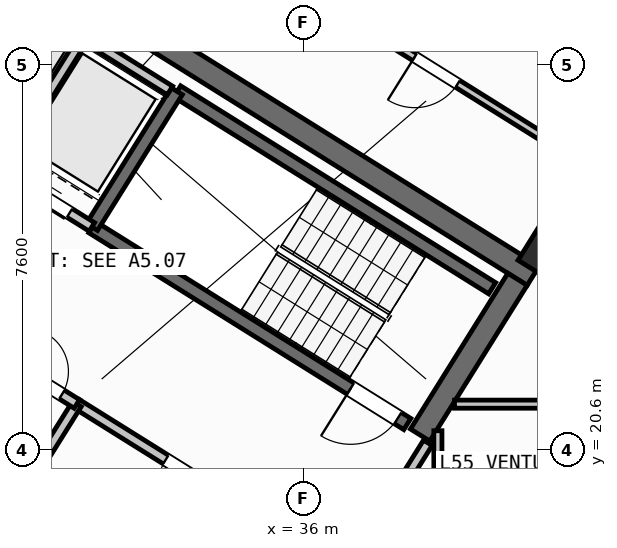
"""IFC4 building model, lengths in metres.
Left out: names, types, materials, properties, quantities, classifications, styles, units other than length and angle.
Written with IfcOpenShell. Run it as: python <this file> out.ifc"""

import sys

from ifc_helpers import new_model, si_unit, direction, frame, frame_2d, origin, origin_2d, place, context, subcontext, project, spatial, rectangle, hollow_rectangle, extrude, source, transform, mapped, element, fill, save


model = new_model("IFC4")
c1 = context("Model", 3, precision=1e-05, world=origin(), true_north=direction((0.0, 1.0)))
c2 = subcontext(c1, "Body", "Model", "MODEL_VIEW")
j1 = project(units=[si_unit("LENGTHUNIT", "METRE"), si_unit("PLANEANGLEUNIT", "RADIAN")], contexts=[c1])
p1 = place(None, origin())
s1 = spatial("IfcSite", under=j1, at=p1, CompositionType="ELEMENT")
p2 = place(p1, origin())
s2 = spatial("IfcBuilding", under=s1, at=p2, CompositionType="ELEMENT")
p3 = place(p2, frame((0.0, 0.0, 218.4)))
s3 = spatial("IfcBuildingStorey", under=s2, at=p3, CompositionType="ELEMENT", Elevation=218.4)
p4 = place(p3, frame((40.531, 24.036, 0.0), z_axis=(0.0, 0.0, 1.0), x_axis=(-0.848048787466, 0.529918157905, 0.0)))
e1 = element("IfcWall", 1, at=p4, inside=s3, PredefinedType="SHEAR", context=c2, shape_type="SweptSolid", body=[
    extrude(rectangle(XDim=13.04, YDim=0.45, at=frame_2d((6.52, 0.0))), origin(), (0.0, 0.0, 1.0), 3.35),
])
p5 = place(p3, frame((40.221, 23.965, 0.0), z_axis=(0.0, 0.0, 1.0), x_axis=(-0.529902075036, -0.848058836916, 0.0)))
e2 = element("IfcWall", 2, at=p5, inside=s3, PredefinedType="SHEAR", context=c2, shape_type="SweptSolid", body=[
    extrude(rectangle(XDim=3.625, YDim=0.45, at=frame_2d((1.812, 0.0))), origin(), (0.0, 0.0, 1.0), 3.35),
])
m1 = source(origin(), c2, "Body", "SweptSolid", [
    extrude(hollow_rectangle(XDim=0.8, YDim=0.8, WallThickness=0.032, at=origin_2d()), origin(), (0.0, 0.0, 1.0), 3.6),
])
p6 = place(p3, frame((40.783, 24.469, 0.0), z_axis=(0.0, 0.0, 1.0), x_axis=(-0.848048096156, 0.529919264233, 0.0)))
e3 = element("IfcColumn", 3, at=p6, inside=s3, PredefinedType="COLUMN", context=c2, shape_type="MappedRepresentation", body=[
    mapped(m1, transform((0.0, 0.0, 0.0), scale=1.0)),
])
p7 = place(p3, frame((31.76, 12.183, 0.0), z_axis=(0.0, 0.0, 1.0), x_axis=(-0.848047074256, 0.529920899612, 0.0)))
e4 = element("IfcWall", 4, at=p7, inside=s3, PredefinedType="STANDARD", context=c2, shape_type="SweptSolid", body=[
    extrude(rectangle(XDim=30.652, YDim=0.32, at=frame_2d((15.326, 0.0))), origin(), (0.0, 0.0, 1.0), 3.35),
])
p8 = place(p7, frame((15.166, 0.0, 0.0)))
e5 = element("IfcOpeningElement", 5, at=p8, cuts=e4, PredefinedType="OPENING", context=c2, shape_type="SweptSolid", body=[
    extrude(rectangle(XDim=1.2, YDim=2.15, at=frame_2d((0.6, 1.075))), frame((0.0, 0.17, 0.0), z_axis=(0.0, -1.0, 0.0), x_axis=(1.0, 0.0, 0.0)), (0.0, 0.0, 1.0), 0.34),
])
p9 = place(p7, frame((2.24, 0.0, 0.9)))
e6 = element("IfcOpeningElement", 6, at=p9, cuts=e4, PredefinedType="OPENING", context=c2, shape_type="SweptSolid", body=[
    extrude(rectangle(XDim=1.65, YDim=1.45, at=frame_2d((0.825, 0.725))), frame((0.0, 0.17, 0.0), z_axis=(0.0, -1.0, 0.0), x_axis=(1.0, 0.0, 0.0)), (0.0, 0.0, 1.0), 0.34),
])
p10 = place(p7, frame((7.469, 0.0, 0.9)))
e7 = element("IfcOpeningElement", 7, at=p10, cuts=e4, PredefinedType="OPENING", context=c2, shape_type="SweptSolid", body=[
    extrude(rectangle(XDim=1.65, YDim=1.45, at=frame_2d((0.825, 0.725))), frame((0.0, 0.17, 0.0), z_axis=(0.0, -1.0, 0.0), x_axis=(1.0, 0.0, 0.0)), (0.0, 0.0, 1.0), 0.34),
])
p11 = place(p7, frame((12.623, 0.0, 1.0)))
e8 = element("IfcOpeningElement", 8, at=p11, cuts=e4, PredefinedType="OPENING", context=c2, shape_type="SweptSolid", body=[
    extrude(rectangle(XDim=0.9, YDim=1.25, at=frame_2d((0.45, 0.625))), frame((0.0, 0.17, 0.0), z_axis=(0.0, -1.0, 0.0), x_axis=(1.0, 0.0, 0.0)), (0.0, 0.0, 1.0), 0.34),
])
p12 = place(p7, frame((19.583, 0.0, 1.0)))
e9 = element("IfcOpeningElement", 9, at=p12, cuts=e4, PredefinedType="OPENING", context=c2, shape_type="SweptSolid", body=[
    extrude(rectangle(XDim=0.9, YDim=1.25, at=frame_2d((0.45, 0.625))), frame((0.0, 0.17, 0.0), z_axis=(0.0, -1.0, 0.0), x_axis=(1.0, 0.0, 0.0)), (0.0, 0.0, 1.0), 0.34),
])
p13 = place(p7, frame((22.033, 0.0, 1.0)))
e10 = element("IfcOpeningElement", 10, at=p13, cuts=e4, PredefinedType="OPENING", context=c2, shape_type="SweptSolid", body=[
    extrude(rectangle(XDim=0.9, YDim=1.25, at=frame_2d((0.45, 0.625))), frame((0.0, 0.17, 0.0), z_axis=(0.0, -1.0, 0.0), x_axis=(1.0, 0.0, 0.0)), (0.0, 0.0, 1.0), 0.34),
])
p14 = place(p7, frame((27.666, 0.0, 0.9)))
e11 = element("IfcOpeningElement", 11, at=p14, cuts=e4, PredefinedType="OPENING", context=c2, shape_type="SweptSolid", body=[
    extrude(rectangle(XDim=1.35, YDim=1.45, at=frame_2d((0.675, 0.725))), frame((0.0, 0.17, 0.0), z_axis=(0.0, -1.0, 0.0), x_axis=(1.0, 0.0, 0.0)), (0.0, 0.0, 1.0), 0.34),
])
p15 = place(p3, frame((31.28, 18.261, 0.0), z_axis=(0.0, 0.0, 1.0), x_axis=(-0.848051618787, 0.529913626805, 0.0)))
e12 = element("IfcWall", 12, at=p15, inside=s3, PredefinedType="SHEAR", context=c2, shape_type="SweptSolid", body=[
    extrude(rectangle(XDim=7.46, YDim=0.26, at=frame_2d((3.73, 0.0))), origin(), (0.0, 0.0, 1.0), 3.35),
])
p16 = place(p15, frame((0.36, 0.0, 0.0)))
e13 = element("IfcOpeningElement", 13, at=p16, cuts=e12, PredefinedType="OPENING", context=c2, shape_type="SweptSolid", body=[
    extrude(rectangle(XDim=0.86, YDim=2.05, at=frame_2d((0.43, 1.025))), frame((0.0, 0.14, 0.0), z_axis=(0.0, -1.0, 0.0), x_axis=(1.0, 0.0, 0.0)), (0.0, 0.0, 1.0), 0.28),
])
p17 = place(p3, frame((39.721, 23.788, 0.0), z_axis=(0.0, 0.0, 1.0), x_axis=(-0.848054434086, 0.529909121291, 0.0)))
e14 = element("IfcWall", 14, at=p17, inside=s3, PredefinedType="SHEAR", context=c2, shape_type="SweptSolid", body=[
    extrude(rectangle(XDim=7.33, YDim=0.26, at=frame_2d((3.665, 0.0))), origin(), (0.0, 0.0, 1.0), 3.35),
])
p18 = place(p3, frame((38.046, 21.108, 0.0), z_axis=(0.0, 0.0, 1.0), x_axis=(-0.848054434086, 0.529909121291, 0.0)))
e15 = element("IfcWall", 15, at=p18, inside=s3, PredefinedType="SHEAR", context=c2, shape_type="SweptSolid", body=[
    extrude(rectangle(XDim=7.33, YDim=0.26, at=frame_2d((3.665, 0.0))), origin(), (0.0, 0.0, 1.0), 3.35),
])
p19 = place(p18, frame((0.22, 0.0, 0.0)))
e16 = element("IfcOpeningElement", 16, at=p19, cuts=e15, PredefinedType="OPENING", context=c2, shape_type="SweptSolid", body=[
    extrude(rectangle(XDim=1.1, YDim=2.1, at=frame_2d((0.55, 1.05))), frame((0.0, 0.14, 0.0), z_axis=(0.0, -1.0, 0.0), x_axis=(1.0, 0.0, 0.0)), (0.0, 0.0, 1.0), 0.28),
])
p20 = place(p3, frame((33.496, 27.677, 0.0), z_axis=(0.0, 0.0, 1.0), x_axis=(-0.529908658664, -0.84805472316, 0.0)))
e17 = element("IfcWall", 17, at=p20, inside=s3, PredefinedType="SHEAR", context=c2, shape_type="SweptSolid", body=[
    extrude(rectangle(XDim=3.16, YDim=0.26, at=frame_2d((1.58, 0.0))), origin(), (0.0, 0.0, 1.0), 3.35),
])
p21 = place(p3, frame((36.459, 18.421, 0.0), z_axis=(0.0, 0.0, 1.0), x_axis=(-0.848059591691, 0.529900867089, 0.0)))
e18 = element("IfcWall", 18, at=p21, inside=s3, PredefinedType="STANDARD", context=c2, shape_type="SweptSolid", body=[
    extrude(rectangle(XDim=5.818, YDim=0.2, at=frame_2d((2.909, 0.0))), origin(), (0.0, 0.0, 1.0), 3.34),
])
p22 = place(p21, frame((2.598, 0.0, 0.0)))
e19 = element("IfcOpeningElement", 19, at=p22, cuts=e18, PredefinedType="OPENING", context=c2, shape_type="SweptSolid", body=[
    extrude(rectangle(XDim=1.15, YDim=2.1, at=frame_2d((0.575, 1.05))), frame((0.0, 0.11, 0.0), z_axis=(0.0, -1.0, 0.0), x_axis=(1.0, 0.0, 0.0)), (0.0, 0.0, 1.0), 0.22),
])
p23 = place(p3, frame((31.822, 24.998, 0.0), z_axis=(0.0, 0.0, 1.0), x_axis=(-0.848054125777, 0.529909614701, 0.0)))
e20 = element("IfcWall", 20, at=p23, inside=s3, PredefinedType="STANDARD", context=c2, shape_type="SweptSolid", body=[
    extrude(rectangle(XDim=4.668, YDim=0.2, at=frame_2d((2.334, 0.0))), origin(), (0.0, 0.0, 1.0), 3.34),
])
p24 = place(p23, frame((0.52, 0.0, 0.0)))
e21 = element("IfcOpeningElement", 21, at=p24, cuts=e20, PredefinedType="OPENING", context=c2, shape_type="SweptSolid", body=[
    extrude(rectangle(XDim=1.2, YDim=2.15, at=frame_2d((0.6, 1.075))), frame((0.0, 0.11, 0.0), z_axis=(0.0, -1.0, 0.0), x_axis=(1.0, 0.0, 0.0)), (0.0, 0.0, 1.0), 0.22),
])
p25 = place(p23, frame((2.54, 0.0, 0.0)))
e22 = element("IfcOpeningElement", 22, at=p25, cuts=e20, PredefinedType="OPENING", context=c2, shape_type="SweptSolid", body=[
    extrude(rectangle(XDim=1.2, YDim=2.15, at=frame_2d((0.6, 1.075))), frame((0.0, 0.11, 0.0), z_axis=(0.0, -1.0, 0.0), x_axis=(1.0, 0.0, 0.0)), (0.0, 0.0, 1.0), 0.22),
])
p26 = place(p3, frame((31.645, 28.716, 0.0), z_axis=(0.0, 0.0, 1.0), x_axis=(-0.52986693015, -0.848080795876, 0.0)))
e23 = element("IfcWall", 23, at=p26, inside=s3, PredefinedType="STANDARD", context=c2, shape_type="SweptSolid", body=[
    extrude(rectangle(XDim=2.66, YDim=0.2, at=frame_2d((1.33, 0.0))), origin(), (0.0, 0.0, 1.0), 3.34),
])
p27 = place(p3, frame((33.363, 27.69, 0.0), z_axis=(0.0, 0.0, 1.0), x_axis=(-0.84804957148, 0.529916903215, 0.0)))
e24 = element("IfcWall", 24, at=p27, inside=s3, PredefinedType="STANDARD", context=c2, shape_type="SweptSolid", body=[
    extrude(rectangle(XDim=4.548, YDim=0.2, at=frame_2d((2.274, 0.0))), origin(), (0.0, 0.0, 1.0), 3.34),
])
p28 = place(p3, frame((31.525, 21.504, 0.0), z_axis=(0.0, 0.0, 1.0), x_axis=(-0.529907497854, -0.848055448493, 0.0)))
e25 = element("IfcWall", 25, at=p28, inside=s3, PredefinedType="STANDARD", context=c2, shape_type="SweptSolid", body=[
    extrude(rectangle(XDim=2.88, YDim=0.2, at=frame_2d((1.44, 0.0))), origin(), (0.0, 0.0, 1.0), 3.34),
])
p29 = place(p3, frame((31.525, 21.504, 0.0), z_axis=(0.0, 0.0, 1.0), x_axis=(-0.848042066329, 0.529928913853, 0.0)))
e26 = element("IfcWall", 26, at=p29, inside=s3, PredefinedType="STANDARD", context=c2, shape_type="SweptSolid", body=[
    extrude(rectangle(XDim=6.268, YDim=0.2, at=frame_2d((3.134, 0.0))), origin(), (0.0, 0.0, 1.0), 3.34),
])
p30 = place(p29, frame((4.4, 0.0, 0.0)))
e27 = element("IfcOpeningElement", 27, at=p30, cuts=e26, PredefinedType="OPENING", context=c2, shape_type="SweptSolid", body=[
    extrude(rectangle(XDim=0.86, YDim=2.05, at=frame_2d((0.43, 1.025))), frame((0.0, 0.11, 0.0), z_axis=(0.0, -1.0, 0.0), x_axis=(1.0, 0.0, 0.0)), (0.0, 0.0, 1.0), 0.22),
])
p31 = place(p29, frame((0.35, 0.0, 0.0)))
e28 = element("IfcOpeningElement", 28, at=p31, cuts=e26, PredefinedType="OPENING", context=c2, shape_type="SweptSolid", body=[
    extrude(rectangle(XDim=0.86, YDim=2.05, at=frame_2d((0.43, 1.025))), frame((0.0, 0.11, 0.0), z_axis=(0.0, -1.0, 0.0), x_axis=(1.0, 0.0, 0.0)), (0.0, 0.0, 1.0), 0.22),
])
p32 = place(p3, frame((41.936, 26.012, 0.0), z_axis=(0.0, 0.0, 1.0), x_axis=(-0.848051154596, 0.529914369676, 0.0)))
e29 = element("IfcWall", 29, at=p32, inside=s3, PredefinedType="PARTITIONING", context=c2, shape_type="SweptSolid", body=[
    extrude(rectangle(XDim=15.57, YDim=0.16, at=frame_2d((7.785, 0.0))), origin(), (0.0, 0.0, 1.0), 3.34),
])
p33 = place(p32, frame((3.415, 0.0, 0.0)))
e30 = element("IfcOpeningElement", 30, at=p33, cuts=e29, PredefinedType="OPENING", context=c2, shape_type="SweptSolid", body=[
    extrude(rectangle(XDim=1.0, YDim=2.1, at=frame_2d((0.5, 1.05))), frame((0.0, 0.09, 0.0), z_axis=(0.0, -1.0, 0.0), x_axis=(1.0, 0.0, 0.0)), (0.0, 0.0, 1.0), 0.18),
])
p34 = place(p32, frame((10.565, 0.0, 0.0)))
e31 = element("IfcOpeningElement", 31, at=p34, cuts=e29, PredefinedType="OPENING", context=c2, shape_type="SweptSolid", body=[
    extrude(rectangle(XDim=1.0, YDim=2.1, at=frame_2d((0.5, 1.05))), frame((0.0, 0.09, 0.0), z_axis=(0.0, -1.0, 0.0), x_axis=(1.0, 0.0, 0.0)), (0.0, 0.0, 1.0), 0.18),
])
p35 = place(p3, frame((38.451, 20.737, 0.0), z_axis=(0.0, 0.0, 1.0), x_axis=(-0.529924799939, -0.848044637038, 0.0)))
e32 = element("IfcWall", 32, at=p35, inside=s3, PredefinedType="STANDARD", context=c2, shape_type="SweptSolid", body=[
    extrude(rectangle(XDim=2.96, YDim=0.2, at=frame_2d((1.48, 0.0))), origin(), (0.0, 0.0, 1.0), 3.34),
])
p36 = place(p35, frame((1.46, 0.0, 0.0)))
e33 = element("IfcOpeningElement", 33, at=p36, cuts=e32, PredefinedType="OPENING", context=c2, shape_type="SweptSolid", body=[
    extrude(rectangle(XDim=0.86, YDim=2.05, at=frame_2d((0.43, 1.025))), frame((0.0, 0.11, 0.0), z_axis=(0.0, -1.0, 0.0), x_axis=(1.0, 0.0, 0.0)), (0.0, 0.0, 1.0), 0.22),
])
p37 = place(p3, frame((38.65, 17.93, 0.0), z_axis=(0.0, 0.0, 1.0), x_axis=(0.0, 1.0, 0.0)))
e34 = element("IfcWall", 34, at=p37, inside=s3, PredefinedType="PARTITIONING", context=c2, shape_type="SweptSolid", body=[
    extrude(rectangle(XDim=3.046, YDim=0.16, at=frame_2d((1.523, 0.0))), origin(), (0.0, 0.0, 1.0), 3.34),
])
p38 = place(p3, frame((38.978, 21.5, 0.0), z_axis=(0.0, 0.0, 1.0), x_axis=(1.0, 0.0, 0.0)))
e35 = element("IfcWall", 35, at=p38, inside=s3, PredefinedType="PARTITIONING", context=c2, shape_type="SweptSolid", body=[
    extrude(rectangle(XDim=7.336, YDim=0.16, at=frame_2d((3.668, 0.0))), origin(), (0.0, 0.0, 1.0), 3.34),
])
m2 = source(origin(), c2, "Body", "SweptSolid", [
    extrude(rectangle(XDim=1.1, YDim=2.1, at=frame_2d((0.55, 1.05))), frame((0.0, 0.025, 0.0), z_axis=(0.0, -1.0, 0.0), x_axis=(1.0, 0.0, 0.0)), (0.0, 0.0, 1.0), 0.05),
])
p39 = place(p19, origin())
e36 = element("IfcDoor", 36, at=p39, inside=s3, OperationType="SINGLE_SWING_RIGHT", PredefinedType="DOOR", context=c2, shape_type="MappedRepresentation", body=[
    mapped(m2, transform((0.0, 0.0, 0.0), scale=1.0)),
])
fill(e16, e36)
m3 = source(origin(), c2, "Body", "SweptSolid", [
    extrude(rectangle(XDim=1.15, YDim=2.1, at=frame_2d((0.575, 1.05))), frame((0.0, 0.025, 0.0), z_axis=(0.0, -1.0, 0.0), x_axis=(1.0, 0.0, 0.0)), (0.0, 0.0, 1.0), 0.05),
])
p40 = place(p22, origin())
e37 = element("IfcDoor", 37, at=p40, inside=s3, OperationType="SINGLE_SWING_LEFT", PredefinedType="DOOR", context=c2, shape_type="MappedRepresentation", body=[
    mapped(m3, transform((0.0, 0.0, 0.0), scale=1.0)),
])
fill(e19, e37)
m4 = source(origin(), c2, "Body", "SweptSolid", [
    extrude(rectangle(XDim=1.2, YDim=2.15, at=frame_2d((0.6, 1.075))), frame((0.0, 0.025, 0.0), z_axis=(0.0, -1.0, 0.0), x_axis=(1.0, 0.0, 0.0)), (0.0, 0.0, 1.0), 0.05),
])
p41 = place(p24, origin())
e38 = element("IfcDoor", 38, at=p41, inside=s3, OperationType="DOUBLE_DOOR_SLIDING", PredefinedType="DOOR", context=c2, shape_type="MappedRepresentation", body=[
    mapped(m4, transform((0.0, 0.0, 0.0), scale=1.0)),
])
fill(e21, e38)
m5 = source(origin(), c2, "Body", "SweptSolid", [
    extrude(rectangle(XDim=0.86, YDim=2.05, at=frame_2d((0.43, 1.025))), frame((0.0, 0.025, 0.0), z_axis=(0.0, -1.0, 0.0), x_axis=(1.0, 0.0, 0.0)), (0.0, 0.0, 1.0), 0.05),
])
p42 = place(p31, frame((0.86, 0.0, 0.0), z_axis=(0.0, 0.0, 1.0), x_axis=(-1.0, 0.0, 0.0)))
e39 = element("IfcDoor", 39, at=p42, inside=s3, OperationType="SINGLE_SWING_LEFT", PredefinedType="DOOR", context=c2, shape_type="MappedRepresentation", body=[
    mapped(m5, transform((0.0, 0.0, 0.0), scale=1.0)),
])
fill(e28, e39)
m6 = source(origin(), c2, "Body", "SweptSolid", [
    extrude(rectangle(XDim=1.0, YDim=2.1, at=frame_2d((0.5, 1.05))), frame((0.0, 0.025, 0.0), z_axis=(0.0, -1.0, 0.0), x_axis=(1.0, 0.0, 0.0)), (0.0, 0.0, 1.0), 0.05),
])
p43 = place(p33, origin())
e40 = element("IfcDoor", 40, at=p43, inside=s3, OperationType="SINGLE_SWING_RIGHT", PredefinedType="DOOR", context=c2, shape_type="MappedRepresentation", body=[
    mapped(m6, transform((0.0, 0.0, 0.0), scale=1.0)),
])
fill(e30, e40)
save(model, sys.argv[1])
